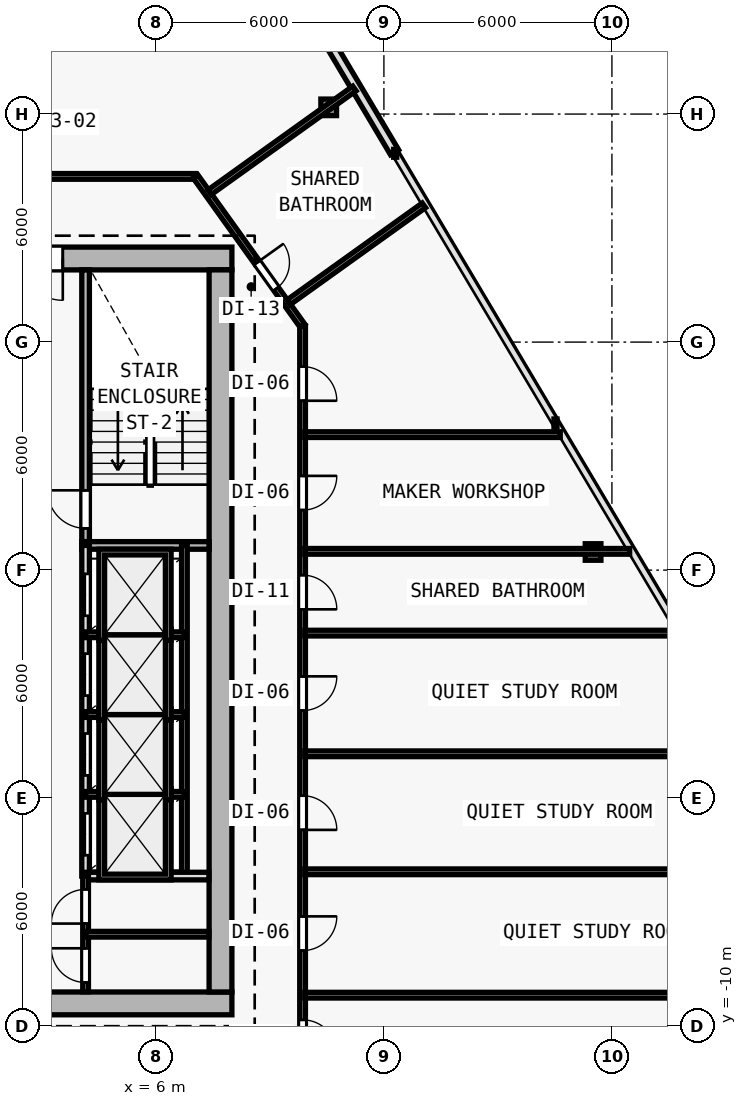
"""IFC4 building model, lengths in metres.
Left out: names, types, materials, properties, quantities, classifications, styles, units other than length and angle.
Written with IfcOpenShell. Run it as: python <this file> out.ifc"""

import sys

from ifc_helpers import new_model, si_unit, direction, frame, frame_2d, origin, origin_2d, place, context, subcontext, project, spatial, rectangle, i_section, extrude, element, fill, save


model = new_model("IFC4")
c1 = context("Model", 3, precision=1e-05, world=origin(), true_north=direction((0.0, 1.0)))
c2 = subcontext(c1, "Body", "Model", "MODEL_VIEW")
j1 = project(units=[si_unit("LENGTHUNIT", "METRE"), si_unit("PLANEANGLEUNIT", "RADIAN")], contexts=[c1])
p1 = place(None, origin())
s1 = spatial("IfcSite", under=j1, at=p1, CompositionType="ELEMENT")
p2 = place(p1, origin())
s2 = spatial("IfcBuilding", under=s1, at=p2, CompositionType="ELEMENT")
p3 = place(p2, frame((0.0, 0.0, 55.2)))
s3 = spatial("IfcBuildingStorey", under=s2, at=p3, CompositionType="ELEMENT", Elevation=55.2)
for number, where, z_axis, x_axis in (
    (1, (7.7, -9.4, 0.0), (0.0, 0.0, 1.0), (1.0, 0.0, 0.0)),
    (2, (7.7, 10.2, 0.0), (0.0, 0.0, 1.0), (1.0, 0.0, 0.0)),
    (3, (7.7, 0.4, 0.0), (0.0, 0.0, 1.0), (1.0, 0.0, 0.0)),
):
    element("IfcColumn", number, at=place(p3, frame(where, z_axis=z_axis, x_axis=x_axis)), inside=s3, PredefinedType="COLUMN", context=c2, shape_type="SweptSolid", body=[
        extrude(i_section(OverallWidth=0.416, OverallDepth=0.446, WebThickness=0.025, FlangeThickness=0.04, FilletRadius=0.015, at=origin_2d()), origin(), (0.0, 0.0, 1.0), 3.6),
    ])
p4 = place(p3, frame((17.504, 2.477, 0.006), z_axis=(-0.018907314261, 0.009589680974, 0.999775250487), x_axis=(-0.452339157861, -0.891845999187, 0.0)))
e4 = element("IfcColumn", 4, at=p4, inside=s3, PredefinedType="COLUMN", context=c2, shape_type="SweptSolid", body=[
    extrude(i_section(OverallWidth=0.412, OverallDepth=0.435, WebThickness=0.023, FlangeThickness=0.037, FilletRadius=0.015, at=origin_2d()), origin(), (0.0, 0.0, 1.0), 3.59),
])
p5 = place(p3, frame((10.547, 14.177, 0.006), z_axis=(-0.011767853257, -0.00258484638, 0.999927415465), x_axis=(0.214538664031, -0.976715496773, 0.0)))
e5 = element("IfcColumn", 5, at=p5, inside=s3, PredefinedType="COLUMN", context=c2, shape_type="SweptSolid", body=[
    extrude(i_section(OverallWidth=0.412, OverallDepth=0.435, WebThickness=0.023, FlangeThickness=0.037, FilletRadius=0.015, at=origin_2d()), origin(), (0.0, 0.0, 1.0), 3.589),
])
p6 = place(p3, frame((6.328, 23.006, 0.0), z_axis=(0.0, 0.0, 1.0), x_axis=(0.511075811474, -0.859535639125, 0.0)))
e6 = element("IfcWall", 6, at=p6, inside=s3, PredefinedType="SOLIDWALL", context=c2, shape_type="SweptSolid", body=[
    extrude(rectangle(XDim=11.646, YDim=0.25, at=frame_2d((5.823, 0.0))), origin(), (0.0, 0.0, 1.0), 3.35),
])
p7 = place(p6, frame((5.373, 0.0, 0.62)))
e7 = element("IfcOpeningElement", 7, at=p7, cuts=e6, PredefinedType="OPENING", context=c2, shape_type="SweptSolid", body=[
    extrude(rectangle(XDim=0.9, YDim=1.6, at=frame_2d((0.45, 0.8))), frame((0.0, 0.135, 0.0), z_axis=(0.0, -1.0, 0.0), x_axis=(1.0, 0.0, 0.0)), (0.0, 0.0, 1.0), 0.27),
])
p8 = place(p3, frame((-8.0, -9.4, 0.0), z_axis=(0.0, 0.0, 1.0), x_axis=(1.0, 0.0, 0.0)))
e8 = element("IfcWall", 8, at=p8, inside=s3, PredefinedType="SHEAR", context=c2, shape_type="SweptSolid", body=[
    extrude(rectangle(XDim=16.0, YDim=0.6, at=frame_2d((8.0, 0.0))), origin(), (0.0, 0.0, 1.0), 3.35),
])
p9 = place(p8, frame((9.65, 0.0, 0.0)))
e9 = element("IfcOpeningElement", 9, at=p9, cuts=e8, PredefinedType="OPENING", context=c2, shape_type="SweptSolid", body=[
    extrude(rectangle(XDim=1.5, YDim=2.2, at=frame_2d((0.75, 1.1))), frame((0.0, 0.31, 0.0), z_axis=(0.0, -1.0, 0.0), x_axis=(1.0, 0.0, 0.0)), (0.0, 0.0, 1.0), 0.62),
])
p10 = place(p3, frame((8.0, 10.2, 0.0), z_axis=(0.0, 0.0, 1.0), x_axis=(-1.0, 0.0, 0.0)))
e10 = element("IfcWall", 10, at=p10, inside=s3, PredefinedType="SHEAR", context=c2, shape_type="SweptSolid", body=[
    extrude(rectangle(XDim=16.0, YDim=0.6, at=frame_2d((8.0, 0.0))), origin(), (0.0, 0.0, 1.0), 3.35),
])
p11 = place(p10, frame((4.45, 0.0, 0.0)))
e11 = element("IfcOpeningElement", 11, at=p11, cuts=e10, PredefinedType="OPENING", context=c2, shape_type="SweptSolid", body=[
    extrude(rectangle(XDim=1.1, YDim=2.15, at=frame_2d((0.55, 1.075))), frame((0.0, 0.31, 0.0), z_axis=(0.0, -1.0, 0.0), x_axis=(1.0, 0.0, 0.0)), (0.0, 0.0, 1.0), 0.62),
])
p12 = place(p3, frame((7.7, 9.9, 0.0), z_axis=(0.0, 0.0, 1.0), x_axis=(0.0, -1.0, 0.0)))
e12 = element("IfcWall", 12, at=p12, inside=s3, PredefinedType="SHEAR", context=c2, shape_type="SweptSolid", body=[
    extrude(rectangle(XDim=19.0, YDim=0.6, at=frame_2d((9.5, 0.0))), origin(), (0.0, 0.0, 1.0), 3.35),
])
p13 = place(p3, frame((4.15, 2.75, 0.0), z_axis=(0.0, 0.0, 1.0), x_axis=(0.0, 1.0, 0.0)))
e13 = element("IfcWall", 13, at=p13, inside=s3, PredefinedType="SOLIDWALL", context=c2, shape_type="SweptSolid", body=[
    extrude(rectangle(XDim=7.15, YDim=0.2, at=frame_2d((3.575, 0.0))), origin(), (0.0, 0.0, 1.0), 3.35),
])
p14 = place(p13, frame((0.35, 0.0, 0.0)))
e14 = element("IfcOpeningElement", 14, at=p14, cuts=e13, PredefinedType="OPENING", context=c2, shape_type="SweptSolid", body=[
    extrude(rectangle(XDim=1.0, YDim=2.15, at=frame_2d((0.5, 1.075))), frame((0.0, 0.11, 0.0), z_axis=(0.0, -1.0, 0.0), x_axis=(1.0, 0.0, 0.0)), (0.0, 0.0, 1.0), 0.22),
])
p15 = place(p3, frame((4.05, 2.65, 0.0), z_axis=(0.0, 0.0, 1.0), x_axis=(1.0, 0.0, 0.0)))
e15 = element("IfcWall", 15, at=p15, inside=s3, PredefinedType="SOLIDWALL", context=c2, shape_type="SweptSolid", body=[
    extrude(rectangle(XDim=3.35, YDim=0.2, at=frame_2d((1.675, 0.0))), origin(), (0.0, 0.0, 1.0), 3.35),
])
p16 = place(p3, frame((4.15, -6.05, 0.0), z_axis=(0.0, 0.0, 1.0), x_axis=(0.0, 1.0, 0.0)))
e16 = element("IfcWall", 16, at=p16, inside=s3, PredefinedType="SOLIDWALL", context=c2, shape_type="SweptSolid", body=[
    extrude(rectangle(XDim=8.7, YDim=0.2, at=frame_2d((4.35, 0.0))), origin(), (0.0, 0.0, 1.0), 3.35),
])
p17 = place(p16, frame((0.55, 0.0, 0.0)))
e17 = element("IfcOpeningElement", 17, at=p17, cuts=e16, PredefinedType="OPENING", context=c2, shape_type="SweptSolid", body=[
    extrude(rectangle(XDim=1.1, YDim=2.15, at=frame_2d((0.55, 1.075))), frame((0.0, 0.11, 0.0), z_axis=(0.0, -1.0, 0.0), x_axis=(1.0, 0.0, 0.0)), (0.0, 0.0, 1.0), 0.22),
])
p18 = place(p16, frame((2.65, 0.0, 0.0)))
e18 = element("IfcOpeningElement", 18, at=p18, cuts=e16, PredefinedType="OPENING", context=c2, shape_type="SweptSolid", body=[
    extrude(rectangle(XDim=1.1, YDim=2.15, at=frame_2d((0.55, 1.075))), frame((0.0, 0.11, 0.0), z_axis=(0.0, -1.0, 0.0), x_axis=(1.0, 0.0, 0.0)), (0.0, 0.0, 1.0), 0.22),
])
p19 = place(p16, frame((4.75, 0.0, 0.0)))
e19 = element("IfcOpeningElement", 19, at=p19, cuts=e16, PredefinedType="OPENING", context=c2, shape_type="SweptSolid", body=[
    extrude(rectangle(XDim=1.1, YDim=2.15, at=frame_2d((0.55, 1.075))), frame((0.0, 0.11, 0.0), z_axis=(0.0, -1.0, 0.0), x_axis=(1.0, 0.0, 0.0)), (0.0, 0.0, 1.0), 0.22),
])
p20 = place(p16, frame((6.85, 0.0, 0.0)))
e20 = element("IfcOpeningElement", 20, at=p20, cuts=e16, PredefinedType="OPENING", context=c2, shape_type="SweptSolid", body=[
    extrude(rectangle(XDim=1.1, YDim=2.15, at=frame_2d((0.55, 1.075))), frame((0.0, 0.11, 0.0), z_axis=(0.0, -1.0, 0.0), x_axis=(1.0, 0.0, 0.0)), (0.0, 0.0, 1.0), 0.22),
])
p21 = place(p3, frame((6.75, -6.05, 0.0), z_axis=(0.0, 0.0, 1.0), x_axis=(0.0, 1.0, 0.0)))
e21 = element("IfcWall", 21, at=p21, inside=s3, PredefinedType="PARTITIONING", context=c2, shape_type="SweptSolid", body=[
    extrude(rectangle(XDim=8.7, YDim=0.15, at=frame_2d((4.35, 0.0))), origin(), (0.0, 0.0, 1.0), 3.35),
])
for number, where, z_axis, x_axis in (
    (22, (4.15, -3.9, 0.0), (0.0, 0.0, 1.0), (1.0, 0.0, 0.0)),
    (23, (4.15, -1.8, 0.0), (0.0, 0.0, 1.0), (1.0, 0.0, 0.0)),
    (24, (4.15, 0.3, 0.0), (0.0, 0.0, 1.0), (1.0, 0.0, 0.0)),
):
    element("IfcWall", number, at=place(p3, frame(where, z_axis=z_axis, x_axis=x_axis)), inside=s3, PredefinedType="PARTITIONING", context=c2, shape_type="SweptSolid", body=[
        extrude(rectangle(XDim=2.6, YDim=0.15, at=frame_2d((1.3, 0.0))), origin(), (0.0, 0.0, 1.0), 3.35),
    ])
p22 = place(p3, frame((4.15, -6.05, 0.0), z_axis=(0.0, 0.0, 1.0), x_axis=(1.0, 0.0, 0.0)))
e25 = element("IfcWall", 25, at=p22, inside=s3, PredefinedType="SOLIDWALL", context=c2, shape_type="SweptSolid", body=[
    extrude(rectangle(XDim=3.245, YDim=0.2, at=frame_2d((1.623, 0.0))), origin(), (0.0, 0.0, 1.0), 3.35),
])
p23 = place(p3, frame((4.15, -9.095, 0.0), z_axis=(0.0, 0.0, 1.0), x_axis=(0.0, 1.0, 0.0)))
e26 = element("IfcWall", 26, at=p23, inside=s3, PredefinedType="PARTITIONING", context=c2, shape_type="SweptSolid", body=[
    extrude(rectangle(XDim=3.045, YDim=0.15, at=frame_2d((1.522, 0.0))), origin(), (0.0, 0.0, 1.0), 3.35),
])
p24 = place(p23, frame((0.245, 0.0, 0.0)))
e27 = element("IfcOpeningElement", 27, at=p24, cuts=e26, PredefinedType="OPENING", context=c2, shape_type="SweptSolid", body=[
    extrude(rectangle(XDim=0.9, YDim=2.1, at=frame_2d((0.45, 1.05))), frame((0.0, 0.085, 0.0), z_axis=(0.0, -1.0, 0.0), x_axis=(1.0, 0.0, 0.0)), (0.0, 0.0, 1.0), 0.17),
])
p25 = place(p23, frame((1.795, 0.0, 0.0)))
e28 = element("IfcOpeningElement", 28, at=p25, cuts=e26, PredefinedType="OPENING", context=c2, shape_type="SweptSolid", body=[
    extrude(rectangle(XDim=0.9, YDim=2.1, at=frame_2d((0.45, 1.05))), frame((0.0, 0.085, 0.0), z_axis=(0.0, -1.0, 0.0), x_axis=(1.0, 0.0, 0.0)), (0.0, 0.0, 1.0), 0.17),
])
p26 = place(p3, frame((4.15, -7.58, 0.0), z_axis=(0.0, 0.0, 1.0), x_axis=(1.0, 0.0, 0.0)))
e29 = element("IfcWall", 29, at=p26, inside=s3, PredefinedType="PARTITIONING", context=c2, shape_type="SweptSolid", body=[
    extrude(rectangle(XDim=3.245, YDim=0.15, at=frame_2d((1.623, 0.0))), origin(), (0.0, 0.0, 1.0), 3.35),
])
p27 = place(p3, frame((-7.041, 12.36, 0.0), z_axis=(0.0, 0.0, 1.0), x_axis=(1.0, 0.0, 0.0)))
e30 = element("IfcWall", 30, at=p27, inside=s3, PredefinedType="PARTITIONING", context=c2, shape_type="SweptSolid", body=[
    extrude(rectangle(XDim=14.082, YDim=0.15, at=frame_2d((7.041, 0.0))), origin(), (0.0, 0.0, 1.0), 3.35),
])
p28 = place(p27, frame((6.591, 0.0, 0.0)))
e31 = element("IfcOpeningElement", 31, at=p28, cuts=e30, PredefinedType="OPENING", context=c2, shape_type="SweptSolid", body=[
    extrude(rectangle(XDim=0.9, YDim=2.1, at=frame_2d((0.45, 1.05))), frame((0.0, 0.085, 0.0), z_axis=(0.0, -1.0, 0.0), x_axis=(1.0, 0.0, 0.0)), (0.0, 0.0, 1.0), 0.17),
])
p29 = place(p3, frame((7.041, 12.36, 0.0), z_axis=(0.0, 0.0, 1.0), x_axis=(0.582449511476, -0.812866881218, 0.0)))
e32 = element("IfcWall", 32, at=p29, inside=s3, PredefinedType="PARTITIONING", context=c2, shape_type="SweptSolid", body=[
    extrude(rectangle(XDim=4.84, YDim=0.15, at=frame_2d((2.42, 0.0))), origin(), (0.0, 0.0, 1.0), 2.725),
])
p30 = place(p29, frame((2.788, 0.0, 0.0)))
e33 = element("IfcOpeningElement", 33, at=p30, cuts=e32, PredefinedType="OPENING", context=c2, shape_type="SweptSolid", body=[
    extrude(rectangle(XDim=0.85, YDim=2.1, at=frame_2d((0.425, 1.05))), frame((0.0, 0.085, 0.0), z_axis=(0.0, -1.0, 0.0), x_axis=(1.0, 0.0, 0.0)), (0.0, 0.0, 1.0), 0.17),
])
p31 = place(p3, frame((9.86, 8.426, 0.0), z_axis=(0.0, 0.0, 1.0), x_axis=(0.0, -1.0, 0.0)))
e34 = element("IfcWall", 34, at=p31, inside=s3, PredefinedType="PARTITIONING", context=c2, shape_type="SweptSolid", body=[
    extrude(rectangle(XDim=19.986, YDim=0.15, at=frame_2d((9.993, 0.0))), origin(), (0.0, 0.0, 1.0), 2.609),
])
p32 = place(p31, frame((18.258, 0.0, 0.0)))
e35 = element("IfcOpeningElement", 35, at=p32, cuts=e34, PredefinedType="OPENING", context=c2, shape_type="SweptSolid", body=[
    extrude(rectangle(XDim=0.9, YDim=2.1, at=frame_2d((0.45, 1.05))), frame((0.0, 0.085, 0.0), z_axis=(0.0, -1.0, 0.0), x_axis=(1.0, 0.0, 0.0)), (0.0, 0.0, 1.0), 0.17),
])
p33 = place(p31, frame((15.536, 0.0, 0.0)))
e36 = element("IfcOpeningElement", 36, at=p33, cuts=e34, PredefinedType="OPENING", context=c2, shape_type="SweptSolid", body=[
    extrude(rectangle(XDim=0.9, YDim=2.1, at=frame_2d((0.45, 1.05))), frame((0.0, 0.085, 0.0), z_axis=(0.0, -1.0, 0.0), x_axis=(1.0, 0.0, 0.0)), (0.0, 0.0, 1.0), 0.17),
])
p34 = place(p31, frame((12.361, 0.0, 0.0)))
e37 = element("IfcOpeningElement", 37, at=p34, cuts=e34, PredefinedType="OPENING", context=c2, shape_type="SweptSolid", body=[
    extrude(rectangle(XDim=0.9, YDim=2.1, at=frame_2d((0.45, 1.05))), frame((0.0, 0.085, 0.0), z_axis=(0.0, -1.0, 0.0), x_axis=(1.0, 0.0, 0.0)), (0.0, 0.0, 1.0), 0.17),
])
p35 = place(p31, frame((9.221, 0.0, 0.0)))
e38 = element("IfcOpeningElement", 38, at=p35, cuts=e34, PredefinedType="OPENING", context=c2, shape_type="SweptSolid", body=[
    extrude(rectangle(XDim=0.9, YDim=2.1, at=frame_2d((0.45, 1.05))), frame((0.0, 0.085, 0.0), z_axis=(0.0, -1.0, 0.0), x_axis=(1.0, 0.0, 0.0)), (0.0, 0.0, 1.0), 0.17),
])
p36 = place(p31, frame((6.557, 0.0, 0.0)))
e39 = element("IfcOpeningElement", 39, at=p36, cuts=e34, PredefinedType="OPENING", context=c2, shape_type="SweptSolid", body=[
    extrude(rectangle(XDim=0.9, YDim=2.1, at=frame_2d((0.45, 1.05))), frame((0.0, 0.085, 0.0), z_axis=(0.0, -1.0, 0.0), x_axis=(1.0, 0.0, 0.0)), (0.0, 0.0, 1.0), 0.17),
])
p37 = place(p31, frame((3.946, 0.0, 0.0)))
e40 = element("IfcOpeningElement", 40, at=p37, cuts=e34, PredefinedType="OPENING", context=c2, shape_type="SweptSolid", body=[
    extrude(rectangle(XDim=0.9, YDim=2.1, at=frame_2d((0.45, 1.05))), frame((0.0, 0.085, 0.0), z_axis=(0.0, -1.0, 0.0), x_axis=(1.0, 0.0, 0.0)), (0.0, 0.0, 1.0), 0.17),
])
p38 = place(p31, frame((1.069, 0.0, 0.0)))
e41 = element("IfcOpeningElement", 41, at=p38, cuts=e34, PredefinedType="OPENING", context=c2, shape_type="SweptSolid", body=[
    extrude(rectangle(XDim=0.9, YDim=2.1, at=frame_2d((0.45, 1.05))), frame((0.0, 0.085, 0.0), z_axis=(0.0, -1.0, 0.0), x_axis=(1.0, 0.0, 0.0)), (0.0, 0.0, 1.0), 0.17),
])
p39 = place(p3, frame((9.92, -9.184, 0.0), z_axis=(0.0, 0.0, 1.0), x_axis=(1.0, 0.0, 0.0)))
e42 = element("IfcWall", 42, at=p39, inside=s3, PredefinedType="PARTITIONING", context=c2, shape_type="SweptSolid", body=[
    extrude(rectangle(XDim=15.49, YDim=0.15, at=frame_2d((7.745, 0.0))), origin(), (0.0, 0.0, 1.0), 2.609),
])
p40 = place(p3, frame((9.92, 2.494, 0.0), z_axis=(0.0, 0.0, 1.0), x_axis=(1.0, 0.0, 0.0)))
e43 = element("IfcWall", 43, at=p40, inside=s3, PredefinedType="PARTITIONING", context=c2, shape_type="SweptSolid", body=[
    extrude(rectangle(XDim=8.546, YDim=0.15, at=frame_2d((4.273, 0.0))), origin(), (0.0, 0.0, 1.0), 2.735),
])
p41 = place(p3, frame((7.414, 11.943, 0.0), z_axis=(0.0, 0.0, 1.0), x_axis=(0.81287753462, 0.582434643295, 0.0)))
e44 = element("IfcWall", 44, at=p41, inside=s3, PredefinedType="PARTITIONING", context=c2, shape_type="SweptSolid", body=[
    extrude(rectangle(XDim=4.688, YDim=0.15, at=frame_2d((2.344, 0.0))), origin(), (0.0, 0.0, 1.0), 2.725),
])
p42 = place(p3, frame((9.92, -2.833, 0.0), z_axis=(0.0, 0.0, 1.0), x_axis=(1.0, 0.0, 0.0)))
e45 = element("IfcWall", 45, at=p42, inside=s3, PredefinedType="PARTITIONING", context=c2, shape_type="SweptSolid", body=[
    extrude(rectangle(XDim=11.714, YDim=0.15, at=frame_2d((5.857, 0.0))), origin(), (0.0, 0.0, 1.0), 2.735),
])
p43 = place(p3, frame((9.49, 9.046, 0.0), z_axis=(0.0, 0.0, 1.0), x_axis=(0.812916011181, 0.582380939562, 0.0)))
e46 = element("IfcWall", 46, at=p43, inside=s3, PredefinedType="PARTITIONING", context=c2, shape_type="SweptSolid", body=[
    extrude(rectangle(XDim=4.383, YDim=0.15, at=frame_2d((2.192, 0.0))), origin(), (0.0, 0.0, 1.0), 2.735),
])
p44 = place(p3, frame((9.92, -5.937, 0.0), z_axis=(0.0, 0.0, 1.0), x_axis=(1.0, 0.0, 0.0)))
e47 = element("IfcWall", 47, at=p44, inside=s3, PredefinedType="PARTITIONING", context=c2, shape_type="SweptSolid", body=[
    extrude(rectangle(XDim=13.56, YDim=0.15, at=frame_2d((6.78, 0.0))), origin(), (0.0, 0.0, 1.0), 2.735),
])
p45 = place(p3, frame((9.92, 0.343, 0.0), z_axis=(0.0, 0.0, 1.0), x_axis=(1.0, 0.0, 0.0)))
e48 = element("IfcWall", 48, at=p45, inside=s3, PredefinedType="PARTITIONING", context=c2, shape_type="SweptSolid", body=[
    extrude(rectangle(XDim=9.826, YDim=0.15, at=frame_2d((4.913, 0.0))), origin(), (0.0, 0.0, 1.0), 2.735),
])
p46 = place(p3, frame((9.92, 5.566, 0.0), z_axis=(0.0, 0.0, 1.0), x_axis=(1.0, 0.0, 0.0)))
e49 = element("IfcWall", 49, at=p46, inside=s3, PredefinedType="PARTITIONING", context=c2, shape_type="SweptSolid", body=[
    extrude(rectangle(XDim=6.72, YDim=0.15, at=frame_2d((3.36, 0.0))), origin(), (0.0, 0.0, 1.0), 2.735),
])
p47 = place(p11, origin())
e50 = element("IfcDoor", 50, at=p47, inside=s3, OperationType="SINGLE_SWING_LEFT", PredefinedType="DOOR", context=c2, shape_type="SweptSolid", body=[
    extrude(rectangle(XDim=1.1, YDim=2.15, at=frame_2d((0.55, 1.075))), frame((0.0, 0.025, 0.0), z_axis=(0.0, -1.0, 0.0), x_axis=(1.0, 0.0, 0.0)), (0.0, 0.0, 1.0), 0.05),
])
fill(e11, e50)
p48 = place(p14, origin())
e51 = element("IfcDoor", 51, at=p48, inside=s3, OperationType="SINGLE_SWING_RIGHT", PredefinedType="DOOR", context=c2, shape_type="SweptSolid", body=[
    extrude(rectangle(XDim=1.0, YDim=2.15, at=frame_2d((0.5, 1.075))), frame((0.0, 0.025, 0.0), z_axis=(0.0, -1.0, 0.0), x_axis=(1.0, 0.0, 0.0)), (0.0, 0.0, 1.0), 0.05),
])
fill(e14, e51)
p49 = place(p17, origin())
e52 = element("IfcDoor", 52, at=p49, inside=s3, OperationType="DOUBLE_DOOR_SLIDING", PredefinedType="DOOR", context=c2, shape_type="SweptSolid", body=[
    extrude(rectangle(XDim=1.1, YDim=2.15, at=frame_2d((0.55, 1.075))), frame((0.0, 0.025, 0.0), z_axis=(0.0, -1.0, 0.0), x_axis=(1.0, 0.0, 0.0)), (0.0, 0.0, 1.0), 0.05),
])
fill(e17, e52)
p50 = place(p18, origin())
e53 = element("IfcDoor", 53, at=p50, inside=s3, OperationType="DOUBLE_DOOR_SLIDING", PredefinedType="DOOR", context=c2, shape_type="SweptSolid", body=[
    extrude(rectangle(XDim=1.1, YDim=2.15, at=frame_2d((0.55, 1.075))), frame((0.0, 0.025, 0.0), z_axis=(0.0, -1.0, 0.0), x_axis=(1.0, 0.0, 0.0)), (0.0, 0.0, 1.0), 0.05),
])
fill(e18, e53)
p51 = place(p19, origin())
e54 = element("IfcDoor", 54, at=p51, inside=s3, OperationType="DOUBLE_DOOR_SLIDING", PredefinedType="DOOR", context=c2, shape_type="SweptSolid", body=[
    extrude(rectangle(XDim=1.1, YDim=2.15, at=frame_2d((0.55, 1.075))), frame((0.0, 0.025, 0.0), z_axis=(0.0, -1.0, 0.0), x_axis=(1.0, 0.0, 0.0)), (0.0, 0.0, 1.0), 0.05),
])
fill(e19, e54)
p52 = place(p20, origin())
e55 = element("IfcDoor", 55, at=p52, inside=s3, OperationType="DOUBLE_DOOR_SLIDING", PredefinedType="DOOR", context=c2, shape_type="SweptSolid", body=[
    extrude(rectangle(XDim=1.1, YDim=2.15, at=frame_2d((0.55, 1.075))), frame((0.0, 0.025, 0.0), z_axis=(0.0, -1.0, 0.0), x_axis=(1.0, 0.0, 0.0)), (0.0, 0.0, 1.0), 0.05),
])
fill(e20, e55)
p53 = place(p24, origin())
e56 = element("IfcDoor", 56, at=p53, inside=s3, OperationType="SINGLE_SWING_RIGHT", PredefinedType="DOOR", context=c2, shape_type="SweptSolid", body=[
    extrude(rectangle(XDim=0.9, YDim=2.1, at=frame_2d((0.45, 1.05))), frame((0.0, 0.025, 0.0), z_axis=(0.0, -1.0, 0.0), x_axis=(1.0, 0.0, 0.0)), (0.0, 0.0, 1.0), 0.05),
])
fill(e27, e56)
p54 = place(p25, origin())
e57 = element("IfcDoor", 57, at=p54, inside=s3, OperationType="SINGLE_SWING_LEFT", PredefinedType="DOOR", context=c2, shape_type="SweptSolid", body=[
    extrude(rectangle(XDim=0.9, YDim=2.1, at=frame_2d((0.45, 1.05))), frame((0.0, 0.025, 0.0), z_axis=(0.0, -1.0, 0.0), x_axis=(1.0, 0.0, 0.0)), (0.0, 0.0, 1.0), 0.05),
])
fill(e28, e57)
p55 = place(p32, origin())
e58 = element("IfcDoor", 58, at=p55, inside=s3, OperationType="SINGLE_SWING_RIGHT", PredefinedType="DOOR", context=c2, shape_type="SweptSolid", body=[
    extrude(rectangle(XDim=0.9, YDim=2.1, at=frame_2d((0.45, 1.05))), frame((0.0, 0.025, 0.0), z_axis=(0.0, -1.0, 0.0), x_axis=(1.0, 0.0, 0.0)), (0.0, 0.0, 1.0), 0.05),
])
fill(e35, e58)
p56 = place(p33, origin())
e59 = element("IfcDoor", 59, at=p56, inside=s3, OperationType="SINGLE_SWING_LEFT", PredefinedType="DOOR", context=c2, shape_type="SweptSolid", body=[
    extrude(rectangle(XDim=0.9, YDim=2.1, at=frame_2d((0.45, 1.05))), frame((0.0, 0.025, 0.0), z_axis=(0.0, -1.0, 0.0), x_axis=(1.0, 0.0, 0.0)), (0.0, 0.0, 1.0), 0.05),
])
fill(e36, e59)
p57 = place(p34, origin())
e60 = element("IfcDoor", 60, at=p57, inside=s3, OperationType="SINGLE_SWING_RIGHT", PredefinedType="DOOR", context=c2, shape_type="SweptSolid", body=[
    extrude(rectangle(XDim=0.9, YDim=2.1, at=frame_2d((0.45, 1.05))), frame((0.0, 0.025, 0.0), z_axis=(0.0, -1.0, 0.0), x_axis=(1.0, 0.0, 0.0)), (0.0, 0.0, 1.0), 0.05),
])
fill(e37, e60)
p58 = place(p35, origin())
e61 = element("IfcDoor", 61, at=p58, inside=s3, OperationType="SINGLE_SWING_LEFT", PredefinedType="DOOR", context=c2, shape_type="SweptSolid", body=[
    extrude(rectangle(XDim=0.9, YDim=2.1, at=frame_2d((0.45, 1.05))), frame((0.0, 0.025, 0.0), z_axis=(0.0, -1.0, 0.0), x_axis=(1.0, 0.0, 0.0)), (0.0, 0.0, 1.0), 0.05),
])
fill(e38, e61)
p59 = place(p36, origin())
e62 = element("IfcDoor", 62, at=p59, inside=s3, OperationType="SINGLE_SWING_RIGHT", PredefinedType="DOOR", context=c2, shape_type="SweptSolid", body=[
    extrude(rectangle(XDim=0.9, YDim=2.1, at=frame_2d((0.45, 1.05))), frame((0.0, 0.025, 0.0), z_axis=(0.0, -1.0, 0.0), x_axis=(1.0, 0.0, 0.0)), (0.0, 0.0, 1.0), 0.05),
])
fill(e39, e62)
p60 = place(p37, origin())
e63 = element("IfcDoor", 63, at=p60, inside=s3, OperationType="SINGLE_SWING_LEFT", PredefinedType="DOOR", context=c2, shape_type="SweptSolid", body=[
    extrude(rectangle(XDim=0.9, YDim=2.1, at=frame_2d((0.45, 1.05))), frame((0.0, 0.025, 0.0), z_axis=(0.0, -1.0, 0.0), x_axis=(1.0, 0.0, 0.0)), (0.0, 0.0, 1.0), 0.05),
])
fill(e40, e63)
p61 = place(p38, origin())
e64 = element("IfcDoor", 64, at=p61, inside=s3, OperationType="SINGLE_SWING_RIGHT", PredefinedType="DOOR", context=c2, shape_type="SweptSolid", body=[
    extrude(rectangle(XDim=0.9, YDim=2.1, at=frame_2d((0.45, 1.05))), frame((0.0, 0.025, 0.0), z_axis=(0.0, -1.0, 0.0), x_axis=(1.0, 0.0, 0.0)), (0.0, 0.0, 1.0), 0.05),
])
fill(e41, e64)
p62 = place(p30, origin())
e65 = element("IfcDoor", 65, at=p62, inside=s3, OperationType="SINGLE_SWING_LEFT", PredefinedType="DOOR", context=c2, shape_type="SweptSolid", body=[
    extrude(rectangle(XDim=0.85, YDim=2.1, at=frame_2d((0.425, 1.05))), frame((0.0, 0.025, 0.0), z_axis=(0.0, -1.0, 0.0), x_axis=(1.0, 0.0, 0.0)), (0.0, 0.0, 1.0), 0.05),
])
fill(e33, e65)
save(model, sys.argv[1])
